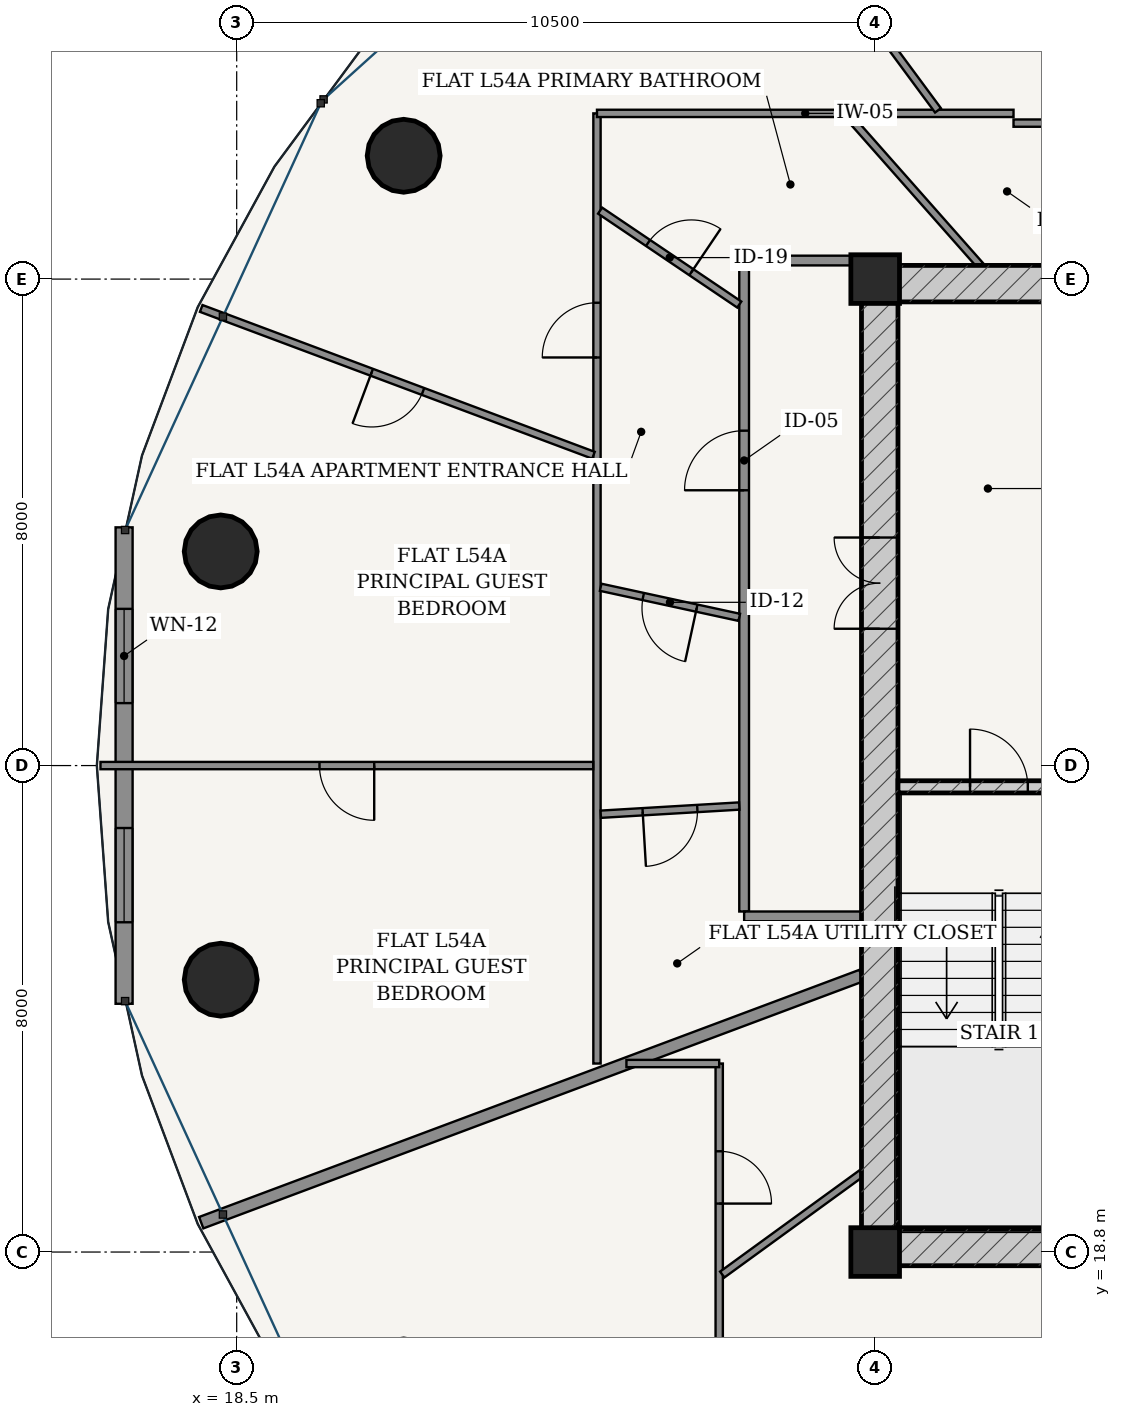
"""IFC4 building model, lengths in metres.
Left out: names, types, materials, properties, quantities, classifications, styles, units other than length and angle.
Written with IfcOpenShell. Run it as: python <this file> out.ifc"""

import sys

from ifc_helpers import new_model, si_unit, direction, frame, frame_2d, origin, origin_2d, place, context, subcontext, project, spatial, rectangle, hollow_circle, extrude, source, transform, mapped, element, fill, save


model = new_model("IFC4")
c1 = context("Model", 3, precision=1e-05, world=origin(), true_north=direction((-0.2419218956, 0.970295726276)))
c2 = subcontext(c1, "Body", "Model", "MODEL_VIEW")
j1 = project(units=[si_unit("LENGTHUNIT", "METRE"), si_unit("PLANEANGLEUNIT", "RADIAN")], contexts=[c1])
p1 = place(None, origin())
s1 = spatial("IfcSite", under=j1, at=p1, CompositionType="ELEMENT")
p2 = place(p1, origin())
s2 = spatial("IfcBuilding", under=s1, at=p2, CompositionType="ELEMENT")
p3 = place(p2, frame((0.0, 0.0, 206.0)))
s3 = spatial("IfcBuildingStorey", under=s2, at=p3, CompositionType="ELEMENT", Elevation=206.0)
for number, where, z_axis, x_axis in (
    (1, (29.0, 18.8, 0.0), (0.0, 0.0, 1.0), (1.0, 0.0, 0.0)),
    (2, (29.0, 34.8, 0.0), (0.0, 0.0, 1.0), (1.0, 0.0, 0.0)),
):
    element("IfcColumn", number, at=place(p3, frame(where, z_axis=z_axis, x_axis=x_axis)), inside=s3, PredefinedType="COLUMN", context=c2, shape_type="SweptSolid", body=[
        extrude(rectangle(XDim=0.8, YDim=0.8, at=origin_2d()), origin(), (0.0, 0.0, 1.0), 3.7),
    ])
p4 = place(p3, frame((28.775, 18.875, 0.0), z_axis=(0.0, 0.0, 1.0), x_axis=(1.0, 0.0, 0.0)))
e3 = element("IfcWall", 3, at=p4, inside=s3, PredefinedType="SHEAR", context=c2, shape_type="SweptSolid", body=[
    extrude(rectangle(XDim=18.45, YDim=0.6, at=frame_2d((9.225, 0.0))), origin(), (0.0, 0.0, 1.0), 3.435),
])
p5 = place(p4, frame((6.76, 0.0, 0.0)))
e4 = element("IfcOpeningElement", 4, at=p5, cuts=e3, PredefinedType="OPENING", context=c2, shape_type="SweptSolid", body=[
    extrude(rectangle(XDim=0.85, YDim=2.1, at=frame_2d((0.425, 1.05))), frame((0.0, 0.31, 0.0), z_axis=(0.0, -1.0, 0.0), x_axis=(1.0, 0.0, 0.0)), (0.0, 0.0, 1.0), 0.62),
])
p6 = place(p4, frame((8.8, 0.0, 0.0)))
e5 = element("IfcOpeningElement", 5, at=p6, cuts=e3, PredefinedType="OPENING", context=c2, shape_type="SweptSolid", body=[
    extrude(rectangle(XDim=0.85, YDim=2.1, at=frame_2d((0.425, 1.05))), frame((0.0, 0.31, 0.0), z_axis=(0.0, -1.0, 0.0), x_axis=(1.0, 0.0, 0.0)), (0.0, 0.0, 1.0), 0.62),
])
p7 = place(p4, frame((10.84, 0.0, 0.0)))
e6 = element("IfcOpeningElement", 6, at=p7, cuts=e3, PredefinedType="OPENING", context=c2, shape_type="SweptSolid", body=[
    extrude(rectangle(XDim=0.85, YDim=2.1, at=frame_2d((0.425, 1.05))), frame((0.0, 0.31, 0.0), z_axis=(0.0, -1.0, 0.0), x_axis=(1.0, 0.0, 0.0)), (0.0, 0.0, 1.0), 0.62),
])
p8 = place(p3, frame((28.775, 34.725, 0.0), z_axis=(0.0, 0.0, 1.0), x_axis=(1.0, 0.0, 0.0)))
e7 = element("IfcWall", 7, at=p8, inside=s3, PredefinedType="SHEAR", context=c2, shape_type="SweptSolid", body=[
    extrude(rectangle(XDim=18.45, YDim=0.6, at=frame_2d((9.225, 0.0))), origin(), (0.0, 0.0, 1.0), 3.435),
])
p9 = place(p3, frame((29.075, 19.175, 0.0), z_axis=(0.0, 0.0, 1.0), x_axis=(0.0, 1.0, 0.0)))
e8 = element("IfcWall", 8, at=p9, inside=s3, PredefinedType="SHEAR", context=c2, shape_type="SweptSolid", body=[
    extrude(rectangle(XDim=15.25, YDim=0.6, at=frame_2d((7.625, 0.0))), origin(), (0.0, 0.0, 1.0), 3.435),
])
p10 = place(p9, frame((9.875, 0.0, 0.0)))
e9 = element("IfcOpeningElement", 9, at=p10, cuts=e8, PredefinedType="OPENING", context=c2, shape_type="SweptSolid", body=[
    extrude(rectangle(XDim=1.5, YDim=2.2, at=frame_2d((0.75, 1.1))), frame((0.0, 0.31, 0.0), z_axis=(0.0, -1.0, 0.0), x_axis=(1.0, 0.0, 0.0)), (0.0, 0.0, 1.0), 0.62),
])
p11 = place(p3, frame((29.375, 26.45, 0.0), z_axis=(0.0, 0.0, 1.0), x_axis=(1.0, 0.0, 0.0)))
e10 = element("IfcWall", 10, at=p11, inside=s3, PredefinedType="SOLIDWALL", context=c2, shape_type="SweptSolid", body=[
    extrude(rectangle(XDim=3.32, YDim=0.2, at=frame_2d((1.66, 0.0))), origin(), (0.0, 0.0, 1.0), 3.435),
])
p12 = place(p11, frame((1.185, 0.0, 0.0)))
e11 = element("IfcOpeningElement", 11, at=p12, cuts=e10, PredefinedType="OPENING", context=c2, shape_type="SweptSolid", body=[
    extrude(rectangle(XDim=0.95, YDim=2.15, at=frame_2d((0.475, 1.075))), frame((0.0, 0.11, 0.0), z_axis=(0.0, -1.0, 0.0), x_axis=(1.0, 0.0, 0.0)), (0.0, 0.0, 1.0), 0.22),
])
for number, where, z_axis, x_axis in (
    (12, (21.246, 36.828, 0.0), (0.0, 0.0, 1.0), (1.0, 0.0, 0.0)),
    (13, (18.237, 30.321, 0.0), (0.0, 0.0, 1.0), (1.0, 0.0, 0.0)),
    (14, (18.237, 23.279, 0.0), (0.0, 0.0, 1.0), (1.0, 0.0, 0.0)),
):
    element("IfcColumn", number, at=place(p3, frame(where, z_axis=z_axis, x_axis=x_axis)), inside=s3, PredefinedType="COLUMN", context=c2, shape_type="SweptSolid", body=[
        extrude(hollow_circle(Radius=0.6, WallThickness=0.038, at=origin_2d()), origin(), (0.0, 0.0, 1.0), 3.7),
    ])
p13 = place(p3, frame((16.648, 30.718, 0.0), z_axis=(0.0, 0.0, 1.0), x_axis=(0.0, -1.0, 0.0)))
e15 = element("IfcWall", 15, at=p13, inside=s3, PredefinedType="SOLIDWALL", context=c2, shape_type="SweptSolid", body=[
    extrude(rectangle(XDim=7.835, YDim=0.28, at=frame_2d((3.917, 0.0))), origin(), (0.0, 0.0, 1.0), 3.435),
])
p14 = place(p13, frame((1.34, 0.0, 0.85)))
e16 = element("IfcOpeningElement", 16, at=p14, cuts=e15, PredefinedType="OPENING", context=c2, shape_type="SweptSolid", body=[
    extrude(rectangle(XDim=1.55, YDim=1.95, at=frame_2d((0.775, 0.975))), frame((0.0, 0.15, 0.0), z_axis=(0.0, -1.0, 0.0), x_axis=(1.0, 0.0, 0.0)), (0.0, 0.0, 1.0), 0.3),
])
p15 = place(p13, frame((4.944, 0.0, 0.85)))
e17 = element("IfcOpeningElement", 17, at=p15, cuts=e15, PredefinedType="OPENING", context=c2, shape_type="SweptSolid", body=[
    extrude(rectangle(XDim=1.55, YDim=1.95, at=frame_2d((0.775, 0.975))), frame((0.0, 0.15, 0.0), z_axis=(0.0, -1.0, 0.0), x_axis=(1.0, 0.0, 0.0)), (0.0, 0.0, 1.0), 0.3),
])
p16 = place(p3, frame((26.845, 24.4, 0.0), z_axis=(0.0, 0.0, 1.0), x_axis=(0.0, 1.0, 0.0)))
e18 = element("IfcWall", 18, at=p16, inside=s3, PredefinedType="PARTITIONING", context=c2, shape_type="SweptSolid", body=[
    extrude(rectangle(XDim=10.625, YDim=0.16, at=frame_2d((5.312, 0.0))), origin(), (0.0, 0.0, 1.0), 2.951),
])
p17 = place(p16, frame((6.927, 0.0, 0.0)))
e19 = element("IfcOpeningElement", 19, at=p17, cuts=e18, PredefinedType="OPENING", context=c2, shape_type="SweptSolid", body=[
    extrude(rectangle(XDim=0.98, YDim=2.2, at=frame_2d((0.49, 1.1))), frame((0.0, 0.09, 0.0), z_axis=(0.0, -1.0, 0.0), x_axis=(1.0, 0.0, 0.0)), (0.0, 0.0, 1.0), 0.18),
])
for number, where, z_axis, x_axis in (
    (20, (26.845, 35.105, 0.0), (0.0, 0.0, 1.0), (1.0, 0.0, 0.0)),
    (21, (26.845, 24.32, 0.0), (0.0, 0.0, 1.0), (1.0, 0.0, 0.0)),
):
    element("IfcWall", number, at=place(p3, frame(where, z_axis=z_axis, x_axis=x_axis)), inside=s3, PredefinedType="PARTITIONING", context=c2, shape_type="SweptSolid", body=[
        extrude(rectangle(XDim=1.93, YDim=0.16, at=frame_2d((0.965, 0.0))), origin(), (0.0, 0.0, 1.0), 3.435),
    ])
p18 = place(p3, frame((24.425, 21.9, 0.0), z_axis=(0.0, 0.0, 1.0), x_axis=(0.0, 1.0, 0.0)))
e22 = element("IfcWall", 22, at=p18, inside=s3, PredefinedType="PARTITIONING", context=c2, shape_type="SweptSolid", body=[
    extrude(rectangle(XDim=15.625, YDim=0.12, at=frame_2d((7.812, 0.0))), origin(), (0.0, 0.0, 1.0), 2.951),
])
p19 = place(p18, frame((11.611, 0.0, 0.0)))
e23 = element("IfcOpeningElement", 23, at=p19, cuts=e22, PredefinedType="OPENING", context=c2, shape_type="SweptSolid", body=[
    extrude(rectangle(XDim=0.9, YDim=2.15, at=frame_2d((0.45, 1.075))), frame((0.0, 0.07, 0.0), z_axis=(0.0, -1.0, 0.0), x_axis=(1.0, 0.0, 0.0)), (0.0, 0.0, 1.0), 0.14),
])
p20 = place(p3, frame((24.425, 37.525, 0.0), z_axis=(0.0, 0.0, 1.0), x_axis=(1.0, 0.0, 0.0)))
e24 = element("IfcWall", 24, at=p20, inside=s3, PredefinedType="PARTITIONING", context=c2, shape_type="SweptSolid", body=[
    extrude(rectangle(XDim=6.85, YDim=0.12, at=frame_2d((3.425, 0.0))), origin(), (0.0, 0.0, 1.0), 2.951),
])
p21 = place(p3, frame((31.275, 37.365, 0.0), z_axis=(0.0, 0.0, 1.0), x_axis=(1.0, 0.0, 0.0)))
e25 = element("IfcWall", 25, at=p21, inside=s3, PredefinedType="PARTITIONING", context=c2, shape_type="SweptSolid", body=[
    extrude(rectangle(XDim=6.623, YDim=0.12, at=frame_2d((3.312, 0.0))), origin(), (0.0, 0.0, 1.0), 2.951),
])
p22 = place(p21, frame((4.413, 0.0, 0.0)))
e26 = element("IfcOpeningElement", 26, at=p22, cuts=e25, PredefinedType="OPENING", context=c2, shape_type="SweptSolid", body=[
    extrude(rectangle(XDim=0.86, YDim=2.15, at=frame_2d((0.43, 1.075))), frame((0.0, 0.07, 0.0), z_axis=(0.0, -1.0, 0.0), x_axis=(1.0, 0.0, 0.0)), (0.0, 0.0, 1.0), 0.14),
])
p23 = place(p21, frame((1.328, 0.0, 0.0)))
e27 = element("IfcOpeningElement", 27, at=p23, cuts=e25, PredefinedType="OPENING", context=c2, shape_type="SweptSolid", body=[
    extrude(rectangle(XDim=0.9, YDim=2.15, at=frame_2d((0.45, 1.075))), frame((0.0, 0.07, 0.0), z_axis=(0.0, -1.0, 0.0), x_axis=(1.0, 0.0, 0.0)), (0.0, 0.0, 1.0), 0.14),
])
p24 = place(p3, frame((30.033, 37.575, 0.0), z_axis=(0.0, 0.0, 1.0), x_axis=(-0.59452500855, 0.804077119565, 0.0)))
e28 = element("IfcWall", 28, at=p24, inside=s3, PredefinedType="PARTITIONING", context=c2, shape_type="SweptSolid", body=[
    extrude(rectangle(XDim=6.867, YDim=0.12, at=frame_2d((3.434, 0.0))), origin(), (0.0, 0.0, 1.0), 2.951),
])
p25 = place(p24, frame((1.976, 0.0, 0.0)))
e29 = element("IfcOpeningElement", 29, at=p25, cuts=e28, PredefinedType="OPENING", context=c2, shape_type="SweptSolid", body=[
    extrude(rectangle(XDim=0.9, YDim=2.15, at=frame_2d((0.45, 1.075))), frame((0.0, 0.07, 0.0), z_axis=(0.0, -1.0, 0.0), x_axis=(1.0, 0.0, 0.0)), (0.0, 0.0, 1.0), 0.14),
])
p26 = place(p3, frame((24.367, 31.903, 0.0), z_axis=(0.0, 0.0, 1.0), x_axis=(-0.936544604529, 0.350548432785, 0.0)))
e30 = element("IfcWall", 30, at=p26, inside=s3, PredefinedType="PARTITIONING", context=c2, shape_type="SweptSolid", body=[
    extrude(rectangle(XDim=6.887, YDim=0.12, at=frame_2d((3.444, 0.0))), origin(), (0.0, 0.0, 1.0), 2.951),
])
p27 = place(p26, frame((2.994, 0.0, 0.0)))
e31 = element("IfcOpeningElement", 31, at=p27, cuts=e30, PredefinedType="OPENING", context=c2, shape_type="SweptSolid", body=[
    extrude(rectangle(XDim=0.9, YDim=2.15, at=frame_2d((0.45, 1.075))), frame((0.0, 0.07, 0.0), z_axis=(0.0, -1.0, 0.0), x_axis=(1.0, 0.0, 0.0)), (0.0, 0.0, 1.0), 0.14),
])
p28 = place(p3, frame((24.363, 26.8, 0.0), z_axis=(0.0, 0.0, 1.0), x_axis=(-1.0, 0.0, 0.0)))
e32 = element("IfcWall", 32, at=p28, inside=s3, PredefinedType="PARTITIONING", context=c2, shape_type="SweptSolid", body=[
    extrude(rectangle(XDim=8.103, YDim=0.12, at=frame_2d((4.052, 0.0))), origin(), (0.0, 0.0, 1.0), 2.951),
])
p29 = place(p28, frame((3.602, 0.0, 0.0)))
e33 = element("IfcOpeningElement", 33, at=p29, cuts=e32, PredefinedType="OPENING", context=c2, shape_type="SweptSolid", body=[
    extrude(rectangle(XDim=0.9, YDim=2.15, at=frame_2d((0.45, 1.075))), frame((0.0, 0.07, 0.0), z_axis=(0.0, -1.0, 0.0), x_axis=(1.0, 0.0, 0.0)), (0.0, 0.0, 1.0), 0.14),
])
p30 = place(p3, frame((30.726, 35.027, 0.0), z_axis=(0.0, 0.0, 1.0), x_axis=(-0.662398427862, 0.749151735475, 0.0)))
e34 = element("IfcWall", 34, at=p30, inside=s3, PredefinedType="PARTITIONING", context=c2, shape_type="SweptSolid", body=[
    extrude(rectangle(XDim=3.273, YDim=0.12, at=frame_2d((1.636, 0.0))), origin(), (0.0, 0.0, 1.0), 3.435),
])
p31 = place(p3, frame((26.765, 34.381, 0.0), z_axis=(0.0, 0.0, 1.0), x_axis=(-0.828908126494, 0.55938476725, 0.0)))
e35 = element("IfcWall", 35, at=p31, inside=s3, PredefinedType="PARTITIONING", context=c2, shape_type="SweptSolid", body=[
    extrude(rectangle(XDim=2.761, YDim=0.12, at=frame_2d((1.38, 0.0))), origin(), (0.0, 0.0, 1.0), 3.11),
])
p32 = place(p31, frame((0.95, 0.0, 0.0)))
e36 = element("IfcOpeningElement", 36, at=p32, cuts=e35, PredefinedType="OPENING", context=c2, shape_type="SweptSolid", body=[
    extrude(rectangle(XDim=0.86, YDim=2.15, at=frame_2d((0.43, 1.075))), frame((0.0, 0.07, 0.0), z_axis=(0.0, -1.0, 0.0), x_axis=(1.0, 0.0, 0.0)), (0.0, 0.0, 1.0), 0.14),
])
p33 = place(p3, frame((26.765, 29.238, 0.0), z_axis=(0.0, 0.0, 1.0), x_axis=(-0.977275456013, 0.211973307458, 0.0)))
e37 = element("IfcWall", 37, at=p33, inside=s3, PredefinedType="PARTITIONING", context=c2, shape_type="SweptSolid", body=[
    extrude(rectangle(XDim=2.332, YDim=0.12, at=frame_2d((1.166, 0.0))), origin(), (0.0, 0.0, 1.0), 3.435),
])
p34 = place(p33, frame((0.716, 0.0, 0.0)))
e38 = element("IfcOpeningElement", 38, at=p34, cuts=e37, PredefinedType="OPENING", context=c2, shape_type="SweptSolid", body=[
    extrude(rectangle(XDim=0.9, YDim=2.15, at=frame_2d((0.45, 1.075))), frame((0.0, 0.07, 0.0), z_axis=(0.0, -1.0, 0.0), x_axis=(1.0, 0.0, 0.0)), (0.0, 0.0, 1.0), 0.14),
])
p35 = place(p3, frame((26.765, 26.135, 0.0), z_axis=(0.0, 0.0, 1.0), x_axis=(-0.998248453424, -0.059161011118, 0.0)))
e39 = element("IfcWall", 39, at=p35, inside=s3, PredefinedType="PARTITIONING", context=c2, shape_type="SweptSolid", body=[
    extrude(rectangle(XDim=2.282, YDim=0.12, at=frame_2d((1.141, 0.0))), origin(), (0.0, 0.0, 1.0), 3.435),
])
p36 = place(p35, frame((0.691, 0.0, 0.0)))
e40 = element("IfcOpeningElement", 40, at=p36, cuts=e39, PredefinedType="OPENING", context=c2, shape_type="SweptSolid", body=[
    extrude(rectangle(XDim=0.9, YDim=2.15, at=frame_2d((0.45, 1.075))), frame((0.0, 0.07, 0.0), z_axis=(0.0, -1.0, 0.0), x_axis=(1.0, 0.0, 0.0)), (0.0, 0.0, 1.0), 0.14),
])
p37 = place(p3, frame((28.775, 23.347, 0.0), z_axis=(0.0, 0.0, 1.0), x_axis=(-0.936537569358, -0.350567227761, 0.0)))
e41 = element("IfcWall", 41, at=p37, inside=s3, PredefinedType="PARTITIONING", context=c2, shape_type="SweptSolid", body=[
    extrude(rectangle(XDim=11.594, YDim=0.2, at=frame_2d((5.797, 0.0))), origin(), (0.0, 0.0, 1.0), 2.951),
])
p38 = place(p3, frame((26.435, 16.235, 0.0), z_axis=(0.0, 0.0, 1.0), x_axis=(0.0, 1.0, 0.0)))
e42 = element("IfcWall", 42, at=p38, inside=s3, PredefinedType="PARTITIONING", context=c2, shape_type="SweptSolid", body=[
    extrude(rectangle(XDim=5.665, YDim=0.12, at=frame_2d((2.833, 0.0))), origin(), (0.0, 0.0, 1.0), 2.951),
])
p39 = place(p38, frame((3.362, 0.0, 0.0)))
e43 = element("IfcOpeningElement", 43, at=p39, cuts=e42, PredefinedType="OPENING", context=c2, shape_type="SweptSolid", body=[
    extrude(rectangle(XDim=0.86, YDim=2.15, at=frame_2d((0.43, 1.075))), frame((0.0, 0.07, 0.0), z_axis=(0.0, -1.0, 0.0), x_axis=(1.0, 0.0, 0.0)), (0.0, 0.0, 1.0), 0.14),
])
p40 = place(p3, frame((26.435, 21.9, 0.0), z_axis=(0.0, 0.0, 1.0), x_axis=(-1.0, 0.0, 0.0)))
e44 = element("IfcWall", 44, at=p40, inside=s3, PredefinedType="PARTITIONING", context=c2, shape_type="SweptSolid", body=[
    extrude(rectangle(XDim=1.526, YDim=0.12, at=frame_2d((0.763, 0.0))), origin(), (0.0, 0.0, 1.0), 3.435),
])
p41 = place(p3, frame((28.775, 20.094, 0.0), z_axis=(0.0, 0.0, 1.0), x_axis=(-0.808862864425, -0.587997335499, 0.0)))
e45 = element("IfcWall", 45, at=p41, inside=s3, PredefinedType="PARTITIONING", context=c2, shape_type="SweptSolid", body=[
    extrude(rectangle(XDim=2.831, YDim=0.12, at=frame_2d((1.416, 0.0))), origin(), (0.0, 0.0, 1.0), 3.435),
])
p42 = place(p3, frame((32.981, 18.575, 0.0), z_axis=(0.0, 0.0, 1.0), x_axis=(-0.520926540997, -0.853601510592, 0.0)))
e46 = element("IfcWall", 46, at=p42, inside=s3, PredefinedType="PARTITIONING", context=c2, shape_type="SweptSolid", body=[
    extrude(rectangle(XDim=2.679, YDim=0.12, at=frame_2d((1.34, 0.0))), origin(), (0.0, 0.0, 1.0), 3.435),
])
m1 = source(origin(), c2, "Body", "SweptSolid", [
    extrude(rectangle(XDim=1.55, YDim=1.95, at=frame_2d((0.775, 0.975))), frame((0.0, 0.03, 0.0), z_axis=(0.0, -1.0, 0.0), x_axis=(1.0, 0.0, 0.0)), (0.0, 0.0, 1.0), 0.06),
])
p43 = place(p14, origin())
e47 = element("IfcWindow", 47, at=p43, inside=s3, PartitioningType="SINGLE_PANEL", PredefinedType="WINDOW", context=c2, shape_type="MappedRepresentation", body=[
    mapped(m1, transform((0.0, 0.0, 0.0), scale=1.0)),
])
fill(e16, e47)
p44 = place(p15, origin())
e48 = element("IfcWindow", 48, at=p44, inside=s3, PartitioningType="SINGLE_PANEL", PredefinedType="WINDOW", context=c2, shape_type="MappedRepresentation", body=[
    mapped(m1, transform((0.0, 0.0, 0.0), scale=1.0)),
])
fill(e17, e48)
m2 = source(origin(), c2, "Body", "SweptSolid", [
    extrude(rectangle(XDim=1.5, YDim=2.2, at=frame_2d((0.75, 1.1))), frame((0.0, 0.025, 0.0), z_axis=(0.0, -1.0, 0.0), x_axis=(1.0, 0.0, 0.0)), (0.0, 0.0, 1.0), 0.05),
])
p45 = place(p10, origin())
e49 = element("IfcDoor", 49, at=p45, inside=s3, OperationType="DOUBLE_DOOR_SINGLE_SWING", PredefinedType="DOOR", context=c2, shape_type="MappedRepresentation", body=[
    mapped(m2, transform((0.0, 0.0, 0.0), scale=1.0)),
])
fill(e9, e49)
m3 = source(origin(), c2, "Body", "SweptSolid", [
    extrude(rectangle(XDim=0.95, YDim=2.15, at=frame_2d((0.475, 1.075))), frame((0.0, 0.025, 0.0), z_axis=(0.0, -1.0, 0.0), x_axis=(1.0, 0.0, 0.0)), (0.0, 0.0, 1.0), 0.05),
])
p46 = place(p12, origin())
e50 = element("IfcDoor", 50, at=p46, inside=s3, OperationType="SINGLE_SWING_LEFT", PredefinedType="DOOR", context=c2, shape_type="MappedRepresentation", body=[
    mapped(m3, transform((0.0, 0.0, 0.0), scale=1.0)),
])
fill(e11, e50)
m4 = source(origin(), c2, "Body", "SweptSolid", [
    extrude(rectangle(XDim=0.98, YDim=2.2, at=frame_2d((0.49, 1.1))), frame((0.0, 0.025, 0.0), z_axis=(0.0, -1.0, 0.0), x_axis=(1.0, 0.0, 0.0)), (0.0, 0.0, 1.0), 0.05),
])
p47 = place(p17, origin())
e51 = element("IfcDoor", 51, at=p47, inside=s3, OperationType="SINGLE_SWING_LEFT", PredefinedType="DOOR", context=c2, shape_type="MappedRepresentation", body=[
    mapped(m4, transform((0.0, 0.0, 0.0), scale=1.0)),
])
fill(e19, e51)
m5 = source(origin(), c2, "Body", "SweptSolid", [
    extrude(rectangle(XDim=0.86, YDim=2.15, at=frame_2d((0.43, 1.075))), frame((0.0, 0.025, 0.0), z_axis=(0.0, -1.0, 0.0), x_axis=(1.0, 0.0, 0.0)), (0.0, 0.0, 1.0), 0.05),
])
p48 = place(p32, frame((0.86, 0.0, 0.0), z_axis=(0.0, 0.0, 1.0), x_axis=(-1.0, 0.0, 0.0)))
e52 = element("IfcDoor", 52, at=p48, inside=s3, OperationType="SINGLE_SWING_RIGHT", PredefinedType="DOOR", context=c2, shape_type="MappedRepresentation", body=[
    mapped(m5, transform((0.0, 0.0, 0.0), scale=1.0)),
])
fill(e36, e52)
m6 = source(origin(), c2, "Body", "SweptSolid", [
    extrude(rectangle(XDim=0.9, YDim=2.15, at=frame_2d((0.45, 1.075))), frame((0.0, 0.025, 0.0), z_axis=(0.0, -1.0, 0.0), x_axis=(1.0, 0.0, 0.0)), (0.0, 0.0, 1.0), 0.05),
])
p49 = place(p34, origin())
e53 = element("IfcDoor", 53, at=p49, inside=s3, OperationType="SINGLE_SWING_LEFT", PredefinedType="DOOR", context=c2, shape_type="MappedRepresentation", body=[
    mapped(m6, transform((0.0, 0.0, 0.0), scale=1.0)),
])
fill(e38, e53)
p50 = place(p36, origin())
e54 = element("IfcDoor", 54, at=p50, inside=s3, OperationType="SINGLE_SWING_RIGHT", PredefinedType="DOOR", context=c2, shape_type="MappedRepresentation", body=[
    mapped(m6, transform((0.0, 0.0, 0.0), scale=1.0)),
])
fill(e40, e54)
p51 = place(p19, origin())
e55 = element("IfcDoor", 55, at=p51, inside=s3, OperationType="SINGLE_SWING_LEFT", PredefinedType="DOOR", context=c2, shape_type="MappedRepresentation", body=[
    mapped(m6, transform((0.0, 0.0, 0.0), scale=1.0)),
])
fill(e23, e55)
p52 = place(p27, origin())
e56 = element("IfcDoor", 56, at=p52, inside=s3, OperationType="SINGLE_SWING_RIGHT", PredefinedType="DOOR", context=c2, shape_type="MappedRepresentation", body=[
    mapped(m6, transform((0.0, 0.0, 0.0), scale=1.0)),
])
fill(e31, e56)
p53 = place(p29, origin())
e57 = element("IfcDoor", 57, at=p53, inside=s3, OperationType="SINGLE_SWING_LEFT", PredefinedType="DOOR", context=c2, shape_type="MappedRepresentation", body=[
    mapped(m6, transform((0.0, 0.0, 0.0), scale=1.0)),
])
fill(e33, e57)
p54 = place(p39, frame((0.86, 0.0, 0.0), z_axis=(0.0, 0.0, 1.0), x_axis=(-1.0, 0.0, 0.0)))
e58 = element("IfcDoor", 58, at=p54, inside=s3, OperationType="SINGLE_SWING_RIGHT", PredefinedType="DOOR", context=c2, shape_type="MappedRepresentation", body=[
    mapped(m5, transform((0.0, 0.0, 0.0), scale=1.0)),
])
fill(e43, e58)
save(model, sys.argv[1])
